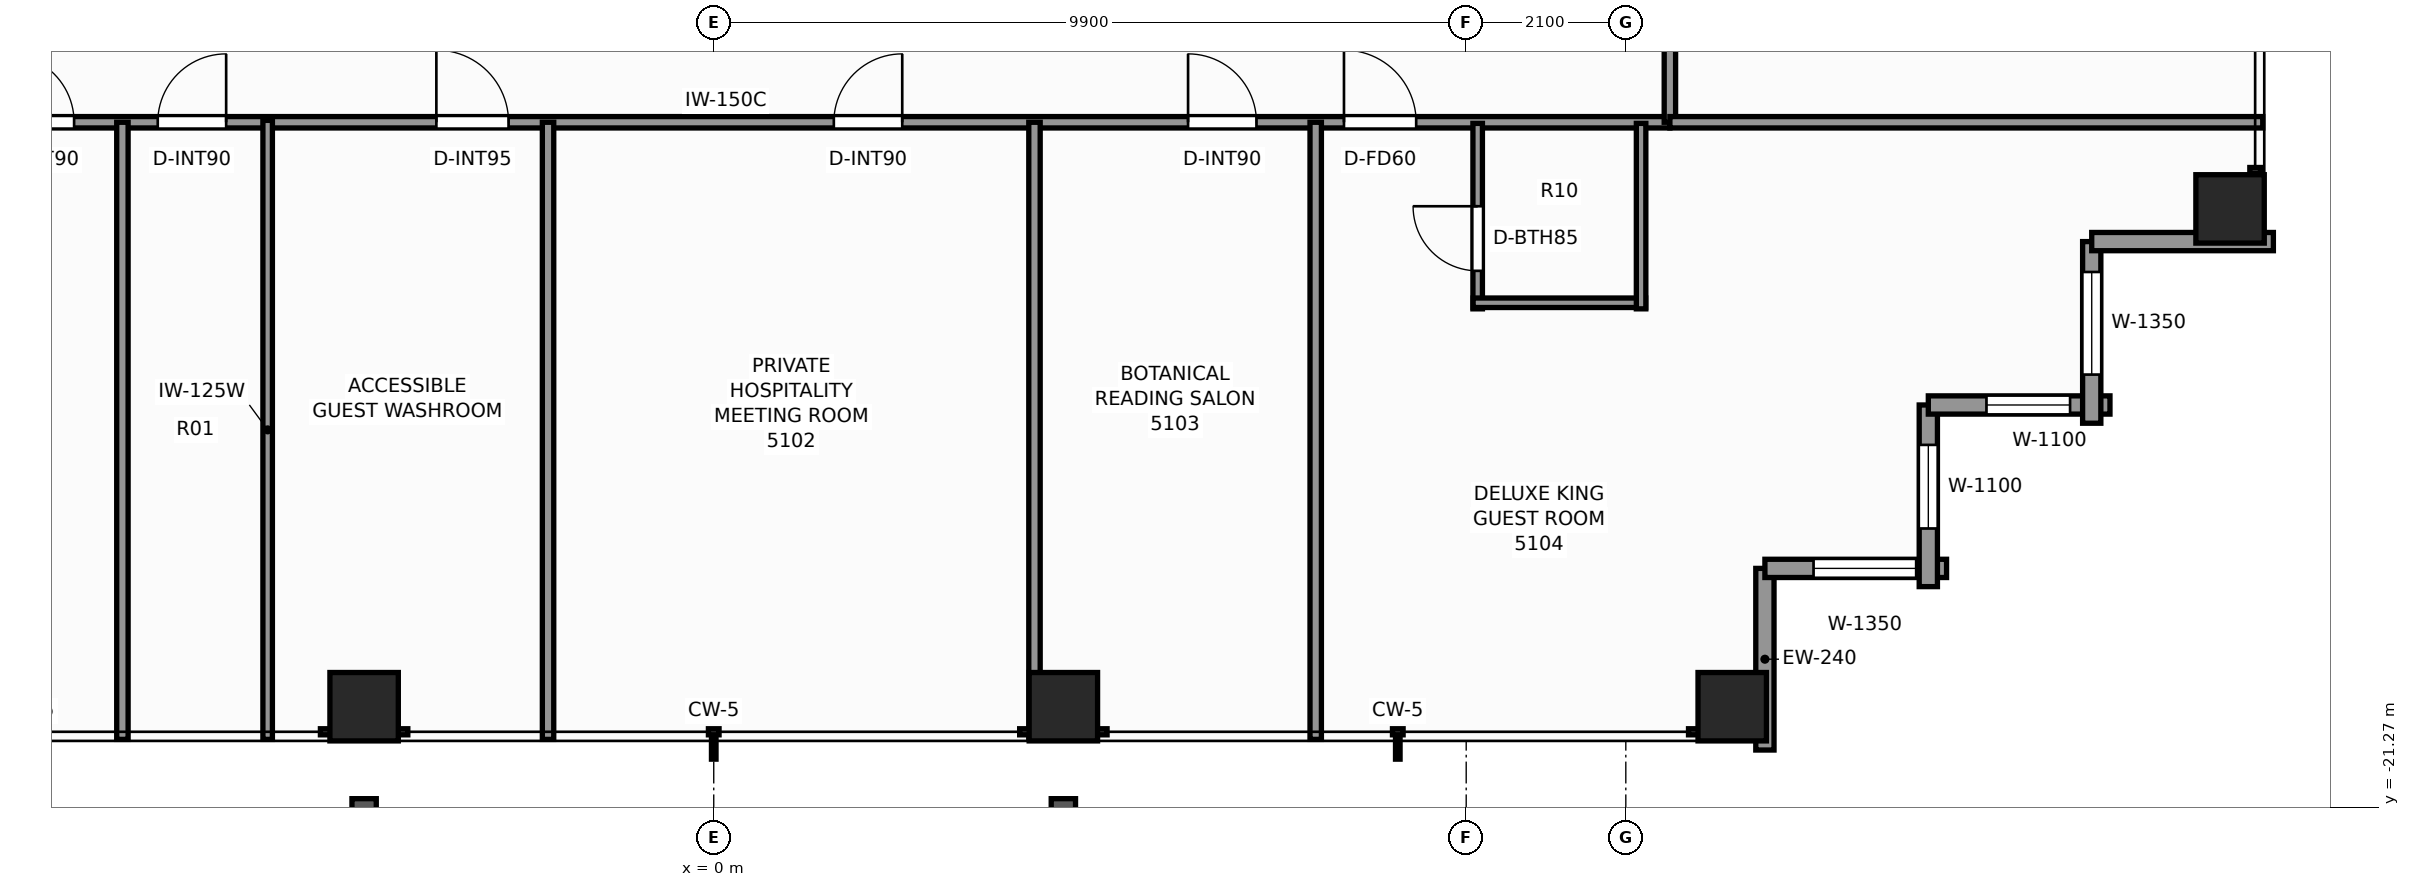
"""IFC4 building model, lengths in metres.
Left out: names, types, materials, properties, quantities, classifications, styles, units other than length and angle.
Written with IfcOpenShell. Run it as: python <this file> out.ifc"""

import sys

from ifc_helpers import new_model, si_unit, direction, frame, frame_2d, origin, origin_2d, place, context, subcontext, project, spatial, rectangle, extrude, element, fill, save


model = new_model("IFC4")
c1 = context("Model", 3, precision=1e-05, world=origin(), true_north=direction((0.0, 1.0)))
c2 = subcontext(c1, "Body", "Model", "MODEL_VIEW")
j1 = project(units=[si_unit("LENGTHUNIT", "METRE"), si_unit("PLANEANGLEUNIT", "RADIAN")], contexts=[c1])
p1 = place(None, origin())
s1 = spatial("IfcSite", under=j1, at=p1, CompositionType="ELEMENT")
p2 = place(p1, origin())
s2 = spatial("IfcBuilding", under=s1, at=p2, CompositionType="ELEMENT")
p3 = place(p2, frame((0.0, 0.0, 176.7)))
s3 = spatial("IfcBuildingStorey", under=s2, at=p3, CompositionType="ELEMENT", Elevation=176.7)
for number, where, z_axis, x_axis in (
    (1, (-4.6, -19.95, 0.0), (0.0, 0.0, 1.0), (1.0, 0.0, 0.0)),
    (2, (4.6, -19.95, 0.0), (0.0, 0.0, 1.0), (1.0, 0.0, 0.0)),
    (3, (13.4, -19.95, 0.0), (0.0, 0.0, 1.0), (1.0, 0.0, 0.0)),
    (4, (19.95, -13.4, 0.0), (0.0, 0.0, 1.0), (1.0, 0.0, 0.0)),
):
    element("IfcColumn", number, at=place(p3, frame(where, z_axis=z_axis, x_axis=x_axis)), inside=s3, PredefinedType="COLUMN", context=c2, shape_type="SweptSolid", body=[
        extrude(rectangle(XDim=0.9, YDim=0.9, at=origin_2d()), origin(), (0.0, 0.0, 1.0), 3.3),
    ])
p4 = place(p3, frame((13.83, -18.13, 0.0), z_axis=(0.0, 0.0, 1.0), x_axis=(0.0, -1.0, 0.0)))
e5 = element("IfcWall", 5, at=p4, inside=s3, PredefinedType="STANDARD", context=c2, shape_type="SweptSolid", body=[
    extrude(rectangle(XDim=2.39, YDim=0.24, at=frame_2d((1.195, 0.0))), origin(), (0.0, 0.0, 1.0), 2.463),
])
p5 = place(p3, frame((16.22, -18.13, 0.0), z_axis=(0.0, 0.0, 1.0), x_axis=(-1.0, 0.0, 0.0)))
e6 = element("IfcWall", 6, at=p5, inside=s3, PredefinedType="STANDARD", context=c2, shape_type="SweptSolid", body=[
    extrude(rectangle(XDim=2.39, YDim=0.24, at=frame_2d((1.195, 0.0))), origin(), (0.0, 0.0, 1.0), 2.463),
])
p6 = place(p5, frame((0.4, 0.0, 0.65)))
e7 = element("IfcOpeningElement", 7, at=p6, cuts=e6, PredefinedType="OPENING", context=c2, shape_type="SweptSolid", body=[
    extrude(rectangle(XDim=1.35, YDim=1.55, at=frame_2d((0.675, 0.775))), frame((0.0, 0.13, 0.0), z_axis=(0.0, -1.0, 0.0), x_axis=(1.0, 0.0, 0.0)), (0.0, 0.0, 1.0), 0.26),
])
p7 = place(p3, frame((15.98, -15.98, 0.0), z_axis=(0.0, 0.0, 1.0), x_axis=(0.0, -1.0, 0.0)))
e8 = element("IfcWall", 8, at=p7, inside=s3, PredefinedType="STANDARD", context=c2, shape_type="SweptSolid", body=[
    extrude(rectangle(XDim=2.39, YDim=0.24, at=frame_2d((1.195, 0.0))), origin(), (0.0, 0.0, 1.0), 2.463),
])
p8 = place(p7, frame((0.525, 0.0, 0.65)))
e9 = element("IfcOpeningElement", 9, at=p8, cuts=e8, PredefinedType="OPENING", context=c2, shape_type="SweptSolid", body=[
    extrude(rectangle(XDim=1.1, YDim=1.45, at=frame_2d((0.55, 0.725))), frame((0.0, 0.13, 0.0), z_axis=(0.0, -1.0, 0.0), x_axis=(1.0, 0.0, 0.0)), (0.0, 0.0, 1.0), 0.26),
])
p9 = place(p3, frame((18.37, -15.98, 0.0), z_axis=(0.0, 0.0, 1.0), x_axis=(-1.0, 0.0, 0.0)))
e10 = element("IfcWall", 10, at=p9, inside=s3, PredefinedType="STANDARD", context=c2, shape_type="SweptSolid", body=[
    extrude(rectangle(XDim=2.39, YDim=0.24, at=frame_2d((1.195, 0.0))), origin(), (0.0, 0.0, 1.0), 2.463),
])
p10 = place(p9, frame((0.525, 0.0, 0.65)))
e11 = element("IfcOpeningElement", 11, at=p10, cuts=e10, PredefinedType="OPENING", context=c2, shape_type="SweptSolid", body=[
    extrude(rectangle(XDim=1.1, YDim=1.45, at=frame_2d((0.55, 0.725))), frame((0.0, 0.13, 0.0), z_axis=(0.0, -1.0, 0.0), x_axis=(1.0, 0.0, 0.0)), (0.0, 0.0, 1.0), 0.26),
])
p11 = place(p3, frame((18.13, -13.83, 0.0), z_axis=(0.0, 0.0, 1.0), x_axis=(0.0, -1.0, 0.0)))
e12 = element("IfcWall", 12, at=p11, inside=s3, PredefinedType="STANDARD", context=c2, shape_type="SweptSolid", body=[
    extrude(rectangle(XDim=2.39, YDim=0.24, at=frame_2d((1.195, 0.0))), origin(), (0.0, 0.0, 1.0), 2.463),
])
p12 = place(p11, frame((0.4, 0.0, 0.65)))
e13 = element("IfcOpeningElement", 13, at=p12, cuts=e12, PredefinedType="OPENING", context=c2, shape_type="SweptSolid", body=[
    extrude(rectangle(XDim=1.35, YDim=1.55, at=frame_2d((0.675, 0.775))), frame((0.0, 0.13, 0.0), z_axis=(0.0, -1.0, 0.0), x_axis=(1.0, 0.0, 0.0)), (0.0, 0.0, 1.0), 0.26),
])
p13 = place(p3, frame((20.52, -13.83, 0.0), z_axis=(0.0, 0.0, 1.0), x_axis=(-1.0, 0.0, 0.0)))
e14 = element("IfcWall", 14, at=p13, inside=s3, PredefinedType="STANDARD", context=c2, shape_type="SweptSolid", body=[
    extrude(rectangle(XDim=2.39, YDim=0.24, at=frame_2d((1.195, 0.0))), origin(), (0.0, 0.0, 1.0), 2.463),
])
p14 = place(p3, frame((-12.26, -12.26, 0.0), z_axis=(0.0, 0.0, 1.0), x_axis=(1.0, 0.0, 0.0)))
e15 = element("IfcWall", 15, at=p14, inside=s3, PredefinedType="PARTITIONING", context=c2, shape_type="SweptSolid", body=[
    extrude(rectangle(XDim=24.84, YDim=0.15, at=frame_2d((12.42, 0.0))), origin(), (0.0, 0.0, 1.0), 2.369),
])
p15 = place(p14, frame((2.944, 0.0, 0.0)))
e16 = element("IfcOpeningElement", 16, at=p15, cuts=e15, PredefinedType="OPENING", context=c2, shape_type="SweptSolid", body=[
    extrude(rectangle(XDim=0.9, YDim=2.06, at=frame_2d((0.45, 1.03))), frame((0.0, 0.085, 0.0), z_axis=(0.0, -1.0, 0.0), x_axis=(1.0, 0.0, 0.0)), (0.0, 0.0, 1.0), 0.17),
])
p16 = place(p14, frame((4.945, 0.0, 0.0)))
e17 = element("IfcOpeningElement", 17, at=p16, cuts=e15, PredefinedType="OPENING", context=c2, shape_type="SweptSolid", body=[
    extrude(rectangle(XDim=0.9, YDim=2.06, at=frame_2d((0.45, 1.03))), frame((0.0, 0.085, 0.0), z_axis=(0.0, -1.0, 0.0), x_axis=(1.0, 0.0, 0.0)), (0.0, 0.0, 1.0), 0.17),
])
p17 = place(p14, frame((8.611, 0.0, 0.0)))
e18 = element("IfcOpeningElement", 18, at=p17, cuts=e15, PredefinedType="OPENING", context=c2, shape_type="SweptSolid", body=[
    extrude(rectangle(XDim=0.95, YDim=2.06, at=frame_2d((0.475, 1.03))), frame((0.0, 0.085, 0.0), z_axis=(0.0, -1.0, 0.0), x_axis=(1.0, 0.0, 0.0)), (0.0, 0.0, 1.0), 0.17),
])
p18 = place(p14, frame((13.84, 0.0, 0.0)))
e19 = element("IfcOpeningElement", 19, at=p18, cuts=e15, PredefinedType="OPENING", context=c2, shape_type="SweptSolid", body=[
    extrude(rectangle(XDim=0.9, YDim=2.06, at=frame_2d((0.45, 1.03))), frame((0.0, 0.085, 0.0), z_axis=(0.0, -1.0, 0.0), x_axis=(1.0, 0.0, 0.0)), (0.0, 0.0, 1.0), 0.17),
])
p19 = place(p14, frame((18.5, 0.0, 0.0)))
e20 = element("IfcOpeningElement", 20, at=p19, cuts=e15, PredefinedType="OPENING", context=c2, shape_type="SweptSolid", body=[
    extrude(rectangle(XDim=0.9, YDim=2.06, at=frame_2d((0.45, 1.03))), frame((0.0, 0.085, 0.0), z_axis=(0.0, -1.0, 0.0), x_axis=(1.0, 0.0, 0.0)), (0.0, 0.0, 1.0), 0.17),
])
p20 = place(p14, frame((20.552, 0.0, 0.0)))
e21 = element("IfcOpeningElement", 21, at=p20, cuts=e15, PredefinedType="OPENING", context=c2, shape_type="SweptSolid", body=[
    extrude(rectangle(XDim=0.95, YDim=2.06, at=frame_2d((0.475, 1.03))), frame((0.0, 0.085, 0.0), z_axis=(0.0, -1.0, 0.0), x_axis=(1.0, 0.0, 0.0)), (0.0, 0.0, 1.0), 0.17),
])
p21 = place(p3, frame((12.58, -12.26, 0.0), z_axis=(0.0, 0.0, 1.0), x_axis=(0.0, 1.0, 0.0)))
e22 = element("IfcWall", 22, at=p21, inside=s3, PredefinedType="PARTITIONING", context=c2, shape_type="SweptSolid", body=[
    extrude(rectangle(XDim=24.84, YDim=0.15, at=frame_2d((12.42, 0.0))), origin(), (0.0, 0.0, 1.0), 2.369),
])
p22 = place(p21, frame((4.275, 0.0, 0.0)))
e23 = element("IfcOpeningElement", 23, at=p22, cuts=e22, PredefinedType="OPENING", context=c2, shape_type="SweptSolid", body=[
    extrude(rectangle(XDim=0.9, YDim=2.06, at=frame_2d((0.45, 1.03))), frame((0.0, 0.085, 0.0), z_axis=(0.0, -1.0, 0.0), x_axis=(1.0, 0.0, 0.0)), (0.0, 0.0, 1.0), 0.17),
])
p23 = place(p21, frame((19.32, 0.0, 0.0)))
e24 = element("IfcOpeningElement", 24, at=p23, cuts=e22, PredefinedType="OPENING", context=c2, shape_type="SweptSolid", body=[
    extrude(rectangle(XDim=0.95, YDim=2.06, at=frame_2d((0.475, 1.03))), frame((0.0, 0.085, 0.0), z_axis=(0.0, -1.0, 0.0), x_axis=(1.0, 0.0, 0.0)), (0.0, 0.0, 1.0), 0.17),
])
p24 = place(p3, frame((12.58, -12.26, 0.0), z_axis=(0.0, 0.0, 1.0), x_axis=(1.0, 0.0, 0.0)))
e25 = element("IfcWall", 25, at=p24, inside=s3, PredefinedType="PARTITIONING", context=c2, shape_type="SweptSolid", body=[
    extrude(rectangle(XDim=7.8, YDim=0.15, at=frame_2d((3.9, 0.0))), origin(), (0.0, 0.0, 1.0), 2.369),
])
for number, where, z_axis, x_axis in (
    (26, (-7.78, -20.38, 0.0), (0.0, 0.0, 1.0), (0.0, 1.0, 0.0)),
    (27, (-2.18, -20.38, 0.0), (0.0, 0.0, 1.0), (0.0, 1.0, 0.0)),
):
    element("IfcWall", number, at=place(p3, frame(where, z_axis=z_axis, x_axis=x_axis)), inside=s3, PredefinedType="PARTITIONING", context=c2, shape_type="SweptSolid", body=[
        extrude(rectangle(XDim=8.12, YDim=0.15, at=frame_2d((4.06, 0.0))), origin(), (0.0, 0.0, 1.0), 2.453),
    ])
p25 = place(p3, frame((-5.869, -20.38, 0.0), z_axis=(0.0, 0.0, 1.0), x_axis=(0.0, 1.0, 0.0)))
e28 = element("IfcWall", 28, at=p25, inside=s3, PredefinedType="PARTITIONING", context=c2, shape_type="SweptSolid", body=[
    extrude(rectangle(XDim=8.145, YDim=0.125, at=frame_2d((4.072, 0.0))), origin(), (0.0, 0.0, 1.0), 2.453),
])
for number, where, z_axis, x_axis in (
    (29, (4.22, -20.38, 0.0), (0.0, 0.0, 1.0), (0.0, 1.0, 0.0)),
    (30, (7.92, -20.38, 0.0), (0.0, 0.0, 1.0), (0.0, 1.0, 0.0)),
):
    element("IfcWall", number, at=place(p3, frame(where, z_axis=z_axis, x_axis=x_axis)), inside=s3, PredefinedType="PARTITIONING", context=c2, shape_type="SweptSolid", body=[
        extrude(rectangle(XDim=8.12, YDim=0.15, at=frame_2d((4.06, 0.0))), origin(), (0.0, 0.0, 1.0), 2.453),
    ])
p26 = place(p3, frame((10.051, -14.715, 0.0), z_axis=(0.0, 0.0, 1.0), x_axis=(0.0, 1.0, 0.0)))
e31 = element("IfcWall", 31, at=p26, inside=s3, PredefinedType="PARTITIONING", context=c2, shape_type="SweptSolid", body=[
    extrude(rectangle(XDim=2.44, YDim=0.125, at=frame_2d((1.22, 0.0))), origin(), (0.0, 0.0, 1.0), 3.08),
])
p27 = place(p26, frame((0.5, 0.0, 0.0)))
e32 = element("IfcOpeningElement", 32, at=p27, cuts=e31, PredefinedType="OPENING", context=c2, shape_type="SweptSolid", body=[
    extrude(rectangle(XDim=0.85, YDim=2.03, at=frame_2d((0.425, 1.015))), frame((0.0, 0.073, 0.0), z_axis=(0.0, -1.0, 0.0), x_axis=(1.0, 0.0, 0.0)), (0.0, 0.0, 1.0), 0.145),
])
p28 = place(p3, frame((9.991, -14.635, 0.0), z_axis=(0.0, 0.0, 1.0), x_axis=(1.0, 0.0, 0.0)))
e33 = element("IfcWall", 33, at=p28, inside=s3, PredefinedType="PARTITIONING", context=c2, shape_type="SweptSolid", body=[
    extrude(rectangle(XDim=2.27, YDim=0.125, at=frame_2d((1.135, 0.0))), origin(), (0.0, 0.0, 1.0), 2.369),
])
p29 = place(p3, frame((12.201, -14.715, 0.0), z_axis=(0.0, 0.0, 1.0), x_axis=(0.0, 1.0, 0.0)))
e34 = element("IfcWall", 34, at=p29, inside=s3, PredefinedType="PARTITIONING", context=c2, shape_type="SweptSolid", body=[
    extrude(rectangle(XDim=2.44, YDim=0.125, at=frame_2d((1.22, 0.0))), origin(), (0.0, 0.0, 1.0), 3.08),
])
p30 = place(p6, origin())
e35 = element("IfcWindow", 35, at=p30, inside=s3, PartitioningType="SINGLE_PANEL", PredefinedType="WINDOW", context=c2, shape_type="SweptSolid", body=[
    extrude(rectangle(XDim=1.35, YDim=1.55, at=frame_2d((0.675, 0.775))), frame((0.0, 0.03, 0.0), z_axis=(0.0, -1.0, 0.0), x_axis=(1.0, 0.0, 0.0)), (0.0, 0.0, 1.0), 0.06),
])
fill(e7, e35)
p31 = place(p8, origin())
e36 = element("IfcWindow", 36, at=p31, inside=s3, PartitioningType="SINGLE_PANEL", PredefinedType="WINDOW", context=c2, shape_type="SweptSolid", body=[
    extrude(rectangle(XDim=1.1, YDim=1.45, at=frame_2d((0.55, 0.725))), frame((0.0, 0.03, 0.0), z_axis=(0.0, -1.0, 0.0), x_axis=(1.0, 0.0, 0.0)), (0.0, 0.0, 1.0), 0.06),
])
fill(e9, e36)
p32 = place(p10, origin())
e37 = element("IfcWindow", 37, at=p32, inside=s3, PartitioningType="SINGLE_PANEL", PredefinedType="WINDOW", context=c2, shape_type="SweptSolid", body=[
    extrude(rectangle(XDim=1.1, YDim=1.45, at=frame_2d((0.55, 0.725))), frame((0.0, 0.03, 0.0), z_axis=(0.0, -1.0, 0.0), x_axis=(1.0, 0.0, 0.0)), (0.0, 0.0, 1.0), 0.06),
])
fill(e11, e37)
p33 = place(p12, origin())
e38 = element("IfcWindow", 38, at=p33, inside=s3, PartitioningType="SINGLE_PANEL", PredefinedType="WINDOW", context=c2, shape_type="SweptSolid", body=[
    extrude(rectangle(XDim=1.35, YDim=1.55, at=frame_2d((0.675, 0.775))), frame((0.0, 0.03, 0.0), z_axis=(0.0, -1.0, 0.0), x_axis=(1.0, 0.0, 0.0)), (0.0, 0.0, 1.0), 0.06),
])
fill(e13, e38)
p34 = place(p15, origin())
e39 = element("IfcDoor", 39, at=p34, inside=s3, OperationType="SINGLE_SWING_LEFT", PredefinedType="DOOR", context=c2, shape_type="SweptSolid", body=[
    extrude(rectangle(XDim=0.9, YDim=2.06, at=frame_2d((0.45, 1.03))), frame((0.0, 0.025, 0.0), z_axis=(0.0, -1.0, 0.0), x_axis=(1.0, 0.0, 0.0)), (0.0, 0.0, 1.0), 0.05),
])
fill(e16, e39)
p35 = place(p16, origin())
e40 = element("IfcDoor", 40, at=p35, inside=s3, OperationType="SINGLE_SWING_RIGHT", PredefinedType="DOOR", context=c2, shape_type="SweptSolid", body=[
    extrude(rectangle(XDim=0.9, YDim=2.06, at=frame_2d((0.45, 1.03))), frame((0.0, 0.025, 0.0), z_axis=(0.0, -1.0, 0.0), x_axis=(1.0, 0.0, 0.0)), (0.0, 0.0, 1.0), 0.05),
])
fill(e17, e40)
p36 = place(p17, origin())
e41 = element("IfcDoor", 41, at=p36, inside=s3, OperationType="SINGLE_SWING_LEFT", PredefinedType="DOOR", context=c2, shape_type="SweptSolid", body=[
    extrude(rectangle(XDim=0.95, YDim=2.06, at=frame_2d((0.475, 1.03))), frame((0.0, 0.025, 0.0), z_axis=(0.0, -1.0, 0.0), x_axis=(1.0, 0.0, 0.0)), (0.0, 0.0, 1.0), 0.05),
])
fill(e18, e41)
p37 = place(p18, origin())
e42 = element("IfcDoor", 42, at=p37, inside=s3, OperationType="SINGLE_SWING_RIGHT", PredefinedType="DOOR", context=c2, shape_type="SweptSolid", body=[
    extrude(rectangle(XDim=0.9, YDim=2.06, at=frame_2d((0.45, 1.03))), frame((0.0, 0.025, 0.0), z_axis=(0.0, -1.0, 0.0), x_axis=(1.0, 0.0, 0.0)), (0.0, 0.0, 1.0), 0.05),
])
fill(e19, e42)
p38 = place(p19, origin())
e43 = element("IfcDoor", 43, at=p38, inside=s3, OperationType="SINGLE_SWING_LEFT", PredefinedType="DOOR", context=c2, shape_type="SweptSolid", body=[
    extrude(rectangle(XDim=0.9, YDim=2.06, at=frame_2d((0.45, 1.03))), frame((0.0, 0.025, 0.0), z_axis=(0.0, -1.0, 0.0), x_axis=(1.0, 0.0, 0.0)), (0.0, 0.0, 1.0), 0.05),
])
fill(e20, e43)
p39 = place(p27, origin())
e44 = element("IfcDoor", 44, at=p39, inside=s3, OperationType="SINGLE_SWING_RIGHT", PredefinedType="DOOR", context=c2, shape_type="SweptSolid", body=[
    extrude(rectangle(XDim=0.85, YDim=2.03, at=frame_2d((0.425, 1.015))), frame((0.0, 0.025, 0.0), z_axis=(0.0, -1.0, 0.0), x_axis=(1.0, 0.0, 0.0)), (0.0, 0.0, 1.0), 0.05),
])
fill(e32, e44)
p40 = place(p20, origin())
e45 = element("IfcDoor", 45, at=p40, inside=s3, OperationType="SINGLE_SWING_LEFT", PredefinedType="DOOR", context=c2, shape_type="SweptSolid", body=[
    extrude(rectangle(XDim=0.95, YDim=2.06, at=frame_2d((0.475, 1.03))), frame((0.0, 0.025, 0.0), z_axis=(0.0, -1.0, 0.0), x_axis=(1.0, 0.0, 0.0)), (0.0, 0.0, 1.0), 0.05),
])
fill(e21, e45)
save(model, sys.argv[1])
